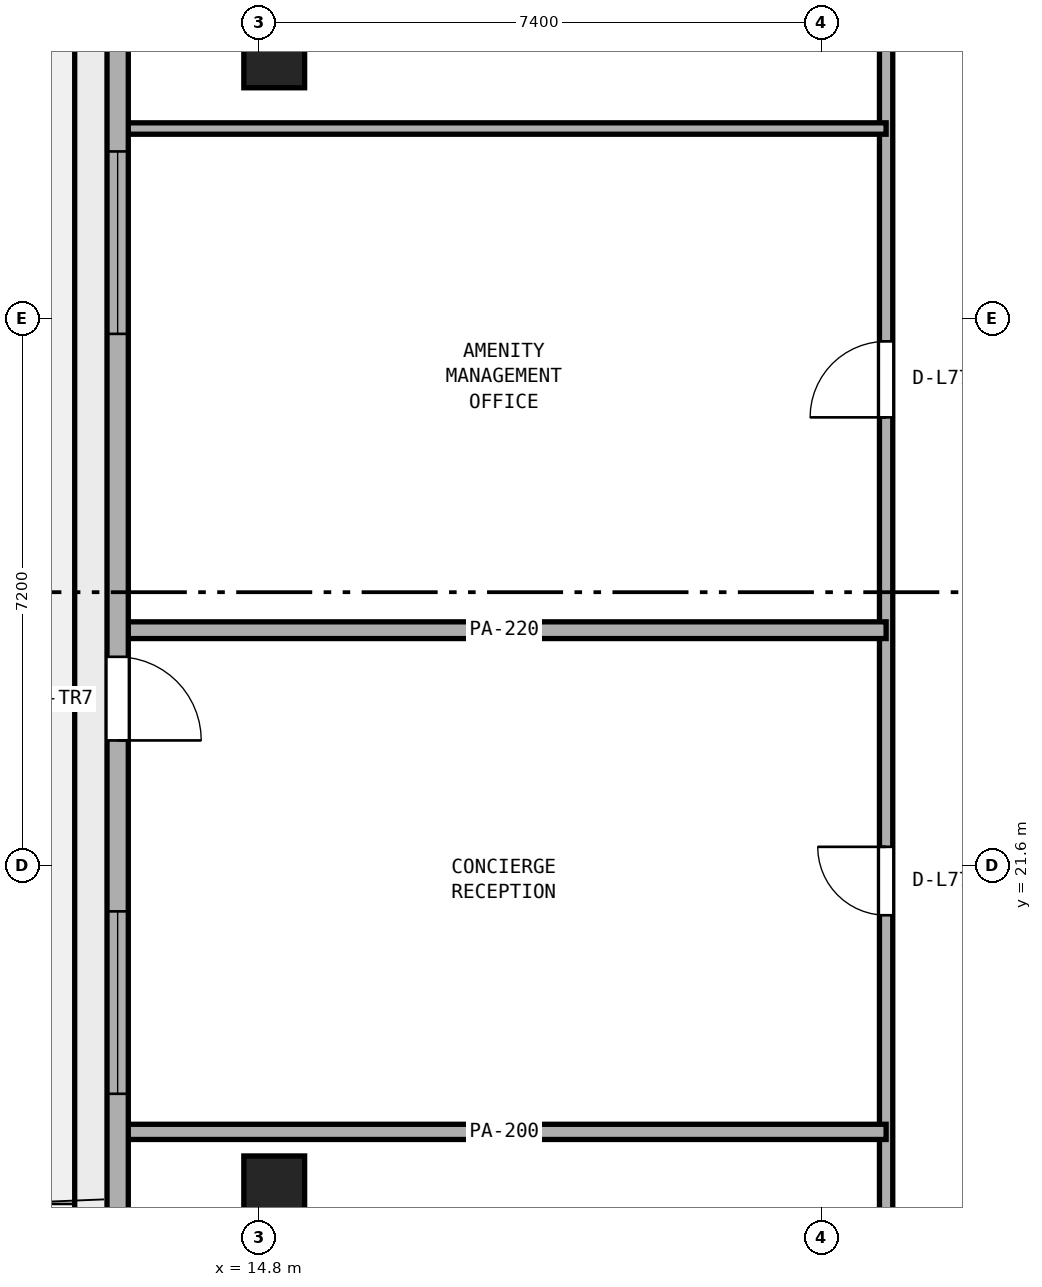
"""IFC4 building model, lengths in metres.
Left out: names, types, materials, properties, quantities, classifications, styles, units other than length and angle.
Written with IfcOpenShell. Run it as: python <this file> out.ifc"""

import sys

from ifc_helpers import new_model, si_unit, direction, frame, frame_2d, origin, origin_2d, place, context, subcontext, project, spatial, rectangle, extrude, element, fill, save


model = new_model("IFC4")
c1 = context("Model", 3, precision=1e-05, world=origin(), true_north=direction((0.0, 1.0)))
c2 = subcontext(c1, "Body", "Model", "MODEL_VIEW")
j1 = project(units=[si_unit("LENGTHUNIT", "METRE"), si_unit("PLANEANGLEUNIT", "RADIAN")], contexts=[c1])
p1 = place(None, origin())
s1 = spatial("IfcSite", under=j1, at=p1, CompositionType="ELEMENT")
p2 = place(p1, origin())
s2 = spatial("IfcBuilding", under=s1, at=p2, CompositionType="ELEMENT")
p3 = place(p2, frame((0.0, 0.0, 301.0)))
s3 = spatial("IfcBuildingStorey", under=s2, at=p3, CompositionType="ELEMENT", Elevation=301.0)
for number, where, z_axis, x_axis in (
    (1, (15.0, 32.236, 0.0), (0.0, 0.0, 1.0), (1.0, 0.0, 0.0)),
    (2, (15.0, 17.383, 0.0), (0.0, 0.0, 1.0), (1.0, 0.0, 0.0)),
):
    element("IfcColumn", number, at=place(p3, frame(where, z_axis=z_axis, x_axis=x_axis)), inside=s3, PredefinedType="COLUMN", context=c2, shape_type="SweptSolid", body=[
        extrude(rectangle(XDim=0.8, YDim=0.8, at=origin_2d()), origin(), (0.0, 0.0, 1.0), 3.8),
    ])
p4 = place(p3, frame((23.05, 6.894, 0.0), z_axis=(0.0, 0.0, 1.0), x_axis=(0.0, 1.0, 0.0)))
e3 = element("IfcWall", 3, at=p4, inside=s3, PredefinedType="PARTITIONING", context=c2, shape_type="SweptSolid", body=[
    extrude(rectangle(XDim=36.312, YDim=0.175, at=frame_2d((18.156, 0.0))), origin(), (0.0, 0.0, 1.0), 3.54),
])
p5 = place(p4, frame((9.031, 0.0, 0.0)))
e4 = element("IfcOpeningElement", 4, at=p5, cuts=e3, PredefinedType="OPENING", context=c2, shape_type="SweptSolid", body=[
    extrude(rectangle(XDim=0.9, YDim=2.1, at=frame_2d((0.45, 1.05))), frame((0.0, 0.097, 0.0), z_axis=(0.0, -1.0, 0.0), x_axis=(1.0, 0.0, 0.0)), (0.0, 0.0, 1.0), 0.195),
])
p6 = place(p4, frame((14.056, 0.0, 0.0)))
e5 = element("IfcOpeningElement", 5, at=p6, cuts=e3, PredefinedType="OPENING", context=c2, shape_type="SweptSolid", body=[
    extrude(rectangle(XDim=0.9, YDim=2.1, at=frame_2d((0.45, 1.05))), frame((0.0, 0.097, 0.0), z_axis=(0.0, -1.0, 0.0), x_axis=(1.0, 0.0, 0.0)), (0.0, 0.0, 1.0), 0.195),
])
p7 = place(p4, frame((20.606, 0.0, 0.0)))
e6 = element("IfcOpeningElement", 6, at=p7, cuts=e3, PredefinedType="OPENING", context=c2, shape_type="SweptSolid", body=[
    extrude(rectangle(XDim=1.0, YDim=2.12, at=frame_2d((0.5, 1.06))), frame((0.0, 0.097, 0.0), z_axis=(0.0, -1.0, 0.0), x_axis=(1.0, 0.0, 0.0)), (0.0, 0.0, 1.0), 0.195),
])
p8 = place(p4, frame((26.181, 0.0, 0.0)))
e7 = element("IfcOpeningElement", 7, at=p8, cuts=e3, PredefinedType="OPENING", context=c2, shape_type="SweptSolid", body=[
    extrude(rectangle(XDim=0.9, YDim=2.1, at=frame_2d((0.45, 1.05))), frame((0.0, 0.097, 0.0), z_axis=(0.0, -1.0, 0.0), x_axis=(1.0, 0.0, 0.0)), (0.0, 0.0, 1.0), 0.195),
])
p9 = place(p3, frame((13.005, 18.1, 0.0), z_axis=(0.0, 0.0, 1.0), x_axis=(1.0, 0.0, 0.0)))
e8 = element("IfcWall", 8, at=p9, inside=s3, PredefinedType="PARTITIONING", context=c2, shape_type="SweptSolid", body=[
    extrude(rectangle(XDim=10.045, YDim=0.2, at=frame_2d((5.022, 0.0))), origin(), (0.0, 0.0, 1.0), 3.54),
])
p10 = place(p3, frame((13.005, 24.7, 0.0), z_axis=(0.0, 0.0, 1.0), x_axis=(1.0, 0.0, 0.0)))
e9 = element("IfcWall", 9, at=p10, inside=s3, PredefinedType="PARTITIONING", context=c2, shape_type="SweptSolid", body=[
    extrude(rectangle(XDim=10.045, YDim=0.22, at=frame_2d((5.022, 0.0))), origin(), (0.0, 0.0, 1.0), 3.54),
])
p11 = place(p3, frame((13.005, 31.3, 0.0), z_axis=(0.0, 0.0, 1.0), x_axis=(1.0, 0.0, 0.0)))
e10 = element("IfcWall", 10, at=p11, inside=s3, PredefinedType="PARTITIONING", context=c2, shape_type="SweptSolid", body=[
    extrude(rectangle(XDim=10.045, YDim=0.15, at=frame_2d((5.022, 0.0))), origin(), (0.0, 0.0, 1.0), 3.54),
])
p12 = place(p3, frame((12.94, 33.548, 0.0), z_axis=(0.0, 0.0, 1.0), x_axis=(0.0, -1.0, 0.0)))
e11 = element("IfcWall", 11, at=p12, inside=s3, PredefinedType="STANDARD", context=c2, shape_type="SweptSolid", body=[
    extrude(rectangle(XDim=17.496, YDim=0.28, at=frame_2d((8.748, 0.0))), origin(), (0.0, 0.0, 1.0), 3.54),
])
p13 = place(p12, frame((9.198, 0.0, 0.0)))
e12 = element("IfcOpeningElement", 12, at=p13, cuts=e11, PredefinedType="OPENING", context=c2, shape_type="SweptSolid", body=[
    extrude(rectangle(XDim=1.1, YDim=2.2, at=frame_2d((0.55, 1.1))), frame((0.0, 0.15, 0.0), z_axis=(0.0, -1.0, 0.0), x_axis=(1.0, 0.0, 0.0)), (0.0, 0.0, 1.0), 0.3),
])
p14 = place(p12, frame((2.549, 0.0, 0.9)))
e13 = element("IfcOpeningElement", 13, at=p14, cuts=e11, PredefinedType="OPENING", context=c2, shape_type="SweptSolid", body=[
    extrude(rectangle(XDim=2.4, YDim=1.75, at=frame_2d((1.2, 0.875))), frame((0.0, 0.15, 0.0), z_axis=(0.0, -1.0, 0.0), x_axis=(1.0, 0.0, 0.0)), (0.0, 0.0, 1.0), 0.3),
])
p15 = place(p12, frame((12.547, 0.0, 0.9)))
e14 = element("IfcOpeningElement", 14, at=p15, cuts=e11, PredefinedType="OPENING", context=c2, shape_type="SweptSolid", body=[
    extrude(rectangle(XDim=2.4, YDim=1.75, at=frame_2d((1.2, 0.875))), frame((0.0, 0.15, 0.0), z_axis=(0.0, -1.0, 0.0), x_axis=(1.0, 0.0, 0.0)), (0.0, 0.0, 1.0), 0.3),
])
p16 = place(p6, origin())
e15 = element("IfcDoor", 15, at=p16, inside=s3, OperationType="SINGLE_SWING_RIGHT", PredefinedType="DOOR", context=c2, shape_type="SweptSolid", body=[
    extrude(rectangle(XDim=0.9, YDim=2.1, at=frame_2d((0.45, 1.05))), frame((0.0, 0.025, 0.0), z_axis=(0.0, -1.0, 0.0), x_axis=(1.0, 0.0, 0.0)), (0.0, 0.0, 1.0), 0.05),
])
fill(e5, e15)
p17 = place(p7, origin())
e16 = element("IfcDoor", 16, at=p17, inside=s3, OperationType="SINGLE_SWING_LEFT", PredefinedType="DOOR", context=c2, shape_type="SweptSolid", body=[
    extrude(rectangle(XDim=1.0, YDim=2.12, at=frame_2d((0.5, 1.06))), frame((0.0, 0.025, 0.0), z_axis=(0.0, -1.0, 0.0), x_axis=(1.0, 0.0, 0.0)), (0.0, 0.0, 1.0), 0.05),
])
fill(e6, e16)
p18 = place(p13, origin())
e17 = element("IfcDoor", 17, at=p18, inside=s3, OperationType="SINGLE_SWING_RIGHT", PredefinedType="DOOR", context=c2, shape_type="SweptSolid", body=[
    extrude(rectangle(XDim=1.1, YDim=2.2, at=frame_2d((0.55, 1.1))), frame((0.0, 0.025, 0.0), z_axis=(0.0, -1.0, 0.0), x_axis=(1.0, 0.0, 0.0)), (0.0, 0.0, 1.0), 0.05),
])
fill(e12, e17)
p19 = place(p14, origin())
e18 = element("IfcWindow", 18, at=p19, inside=s3, PartitioningType="SINGLE_PANEL", PredefinedType="WINDOW", context=c2, shape_type="SweptSolid", body=[
    extrude(rectangle(XDim=2.4, YDim=1.75, at=frame_2d((1.2, 0.875))), frame((0.0, 0.03, 0.0), z_axis=(0.0, -1.0, 0.0), x_axis=(1.0, 0.0, 0.0)), (0.0, 0.0, 1.0), 0.06),
])
fill(e13, e18)
p20 = place(p15, origin())
e19 = element("IfcWindow", 19, at=p20, inside=s3, PartitioningType="SINGLE_PANEL", PredefinedType="WINDOW", context=c2, shape_type="SweptSolid", body=[
    extrude(rectangle(XDim=2.4, YDim=1.75, at=frame_2d((1.2, 0.875))), frame((0.0, 0.03, 0.0), z_axis=(0.0, -1.0, 0.0), x_axis=(1.0, 0.0, 0.0)), (0.0, 0.0, 1.0), 0.06),
])
fill(e14, e19)
save(model, sys.argv[1])
